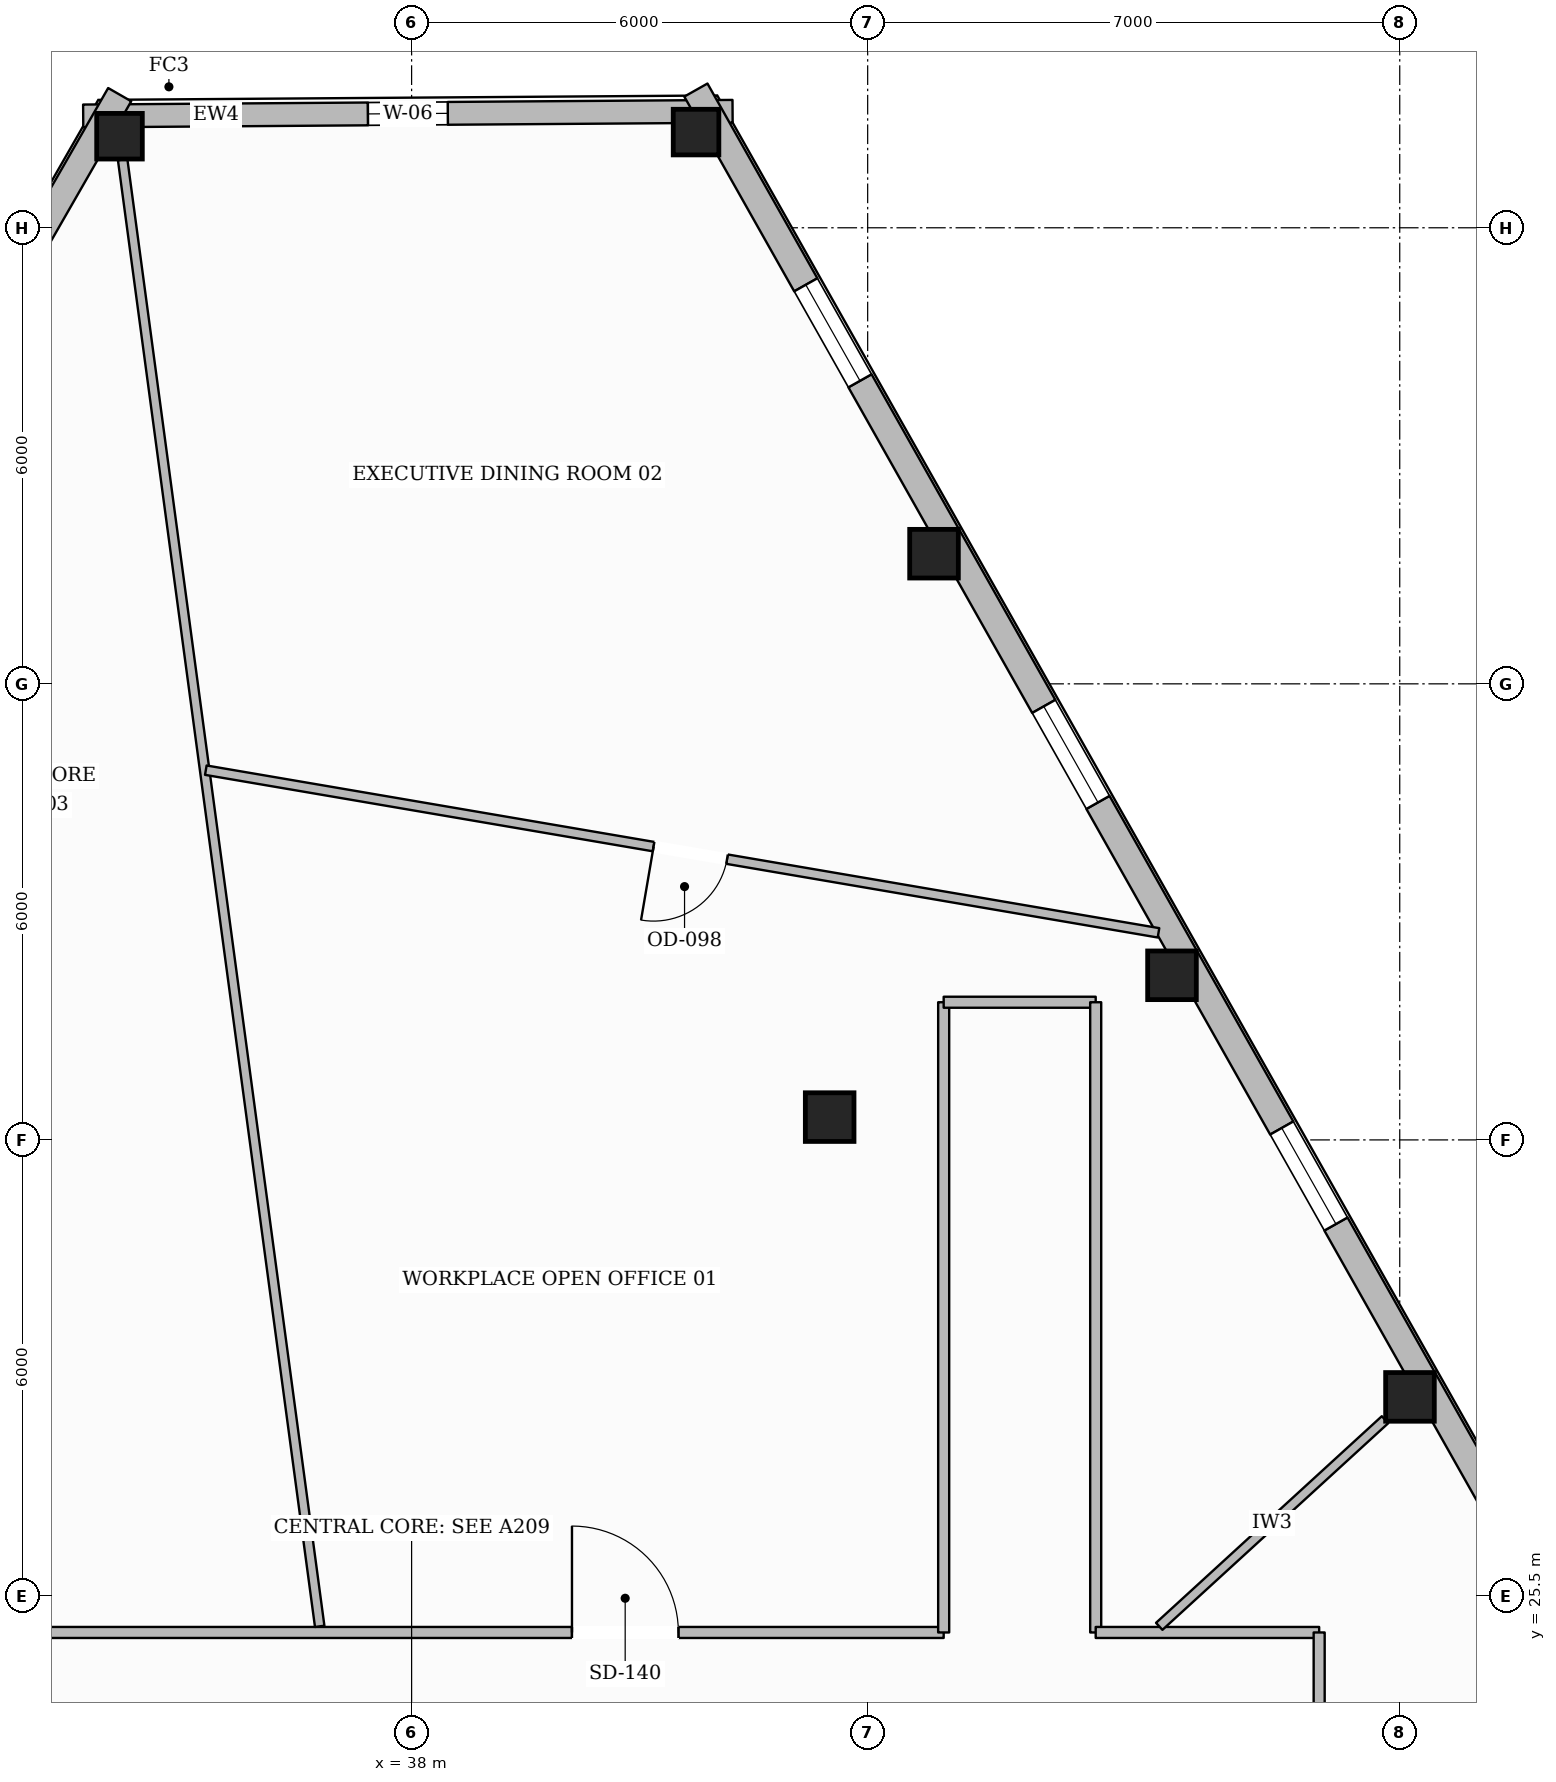
"""IFC4 building model, lengths in metres.
Left out: names, types, materials, properties, quantities, classifications, styles, units other than length and angle.
Written with IfcOpenShell. Run it as: python <this file> out.ifc"""

import sys

from ifc_helpers import new_model, si_unit, direction, frame, frame_2d, origin, origin_2d, place, context, subcontext, project, spatial, rectangle, hollow_rectangle, extrude, element, fill, save


model = new_model("IFC4")
c1 = context("Model", 3, precision=1e-05, world=origin(), true_north=direction((0.0, 1.0)))
c2 = subcontext(c1, "Body", "Model", "MODEL_VIEW")
j1 = project(units=[si_unit("LENGTHUNIT", "METRE"), si_unit("PLANEANGLEUNIT", "RADIAN")], contexts=[c1])
p1 = place(None, origin())
s1 = spatial("IfcSite", under=j1, at=p1, CompositionType="ELEMENT")
p2 = place(p1, origin())
s2 = spatial("IfcBuilding", under=s1, at=p2, CompositionType="ELEMENT")
p3 = place(p2, frame((0.0, 0.0, 226.6)))
s3 = spatial("IfcBuildingStorey", under=s2, at=p3, CompositionType="ELEMENT", Elevation=226.6)
p4 = place(p3, frame((34.157, 44.705, 0.0), z_axis=(0.0, 0.0, 1.0), x_axis=(1.0, 0.0, 0.0)))
e1 = element("IfcColumn", 1, at=p4, inside=s3, PredefinedType="COLUMN", context=c2, shape_type="SweptSolid", body=[
    extrude(hollow_rectangle(XDim=0.6, YDim=0.6, WallThickness=0.028, at=origin_2d()), origin(), (0.0, 0.0, 1.0), 3.6),
])
for number, where, z_axis, x_axis in (
    (2, (51.135, 28.119, 0.0), (0.0, 0.0, 1.0), (1.0, 0.0, 0.0)),
    (3, (48.004, 33.666, 0.0), (0.0, 0.0, 1.0), (1.0, 0.0, 0.0)),
    (4, (44.873, 39.212, 0.0), (0.0, 0.0, 1.0), (1.0, 0.0, 0.0)),
):
    element("IfcColumn", number, at=place(p3, frame(where, z_axis=z_axis, x_axis=x_axis)), inside=s3, PredefinedType="COLUMN", context=c2, shape_type="SweptSolid", body=[
        extrude(hollow_rectangle(XDim=0.64, YDim=0.64, WallThickness=0.028, at=origin_2d()), origin(), (0.0, 0.0, 1.0), 3.6),
    ])
p5 = place(p3, frame((41.742, 44.759, 0.0), z_axis=(0.0, 0.0, 1.0), x_axis=(1.0, 0.0, 0.0)))
e5 = element("IfcColumn", 5, at=p5, inside=s3, PredefinedType="COLUMN", context=c2, shape_type="SweptSolid", body=[
    extrude(hollow_rectangle(XDim=0.6, YDim=0.6, WallThickness=0.028, at=origin_2d()), origin(), (0.0, 0.0, 1.0), 3.6),
])
p6 = place(p3, frame((43.5, 31.8, 0.0), z_axis=(0.0, 0.0, 1.0), x_axis=(1.0, 0.0, 0.0)))
e6 = element("IfcColumn", 6, at=p6, inside=s3, PredefinedType="COLUMN", context=c2, shape_type="SweptSolid", body=[
    extrude(hollow_rectangle(XDim=0.64, YDim=0.64, WallThickness=0.028, at=origin_2d()), origin(), (0.0, 0.0, 1.0), 3.6),
])
p7 = place(p3, frame((33.679, 44.971, 0.0), z_axis=(0.0, 0.0, 1.0), x_axis=(0.999974684305, 0.007115528717, 0.0)))
e7 = element("IfcWall", 7, at=p7, inside=s3, PredefinedType="STANDARD", context=c2, shape_type="SweptSolid", body=[
    extrude(rectangle(XDim=8.543, YDim=0.3, at=frame_2d((4.272, 0.0))), origin(), (0.0, 0.0, 1.0), 3.132),
])
p8 = place(p7, frame((3.747, 0.0, 0.65)))
e8 = element("IfcOpeningElement", 8, at=p8, cuts=e7, PredefinedType="OPENING", context=c2, shape_type="SweptSolid", body=[
    extrude(rectangle(XDim=1.05, YDim=1.7, at=frame_2d((0.525, 0.85))), frame((0.0, 0.16, 0.0), z_axis=(0.0, -1.0, 0.0), x_axis=(1.0, 0.0, 0.0)), (0.0, 0.0, 1.0), 0.32),
])
p9 = place(p3, frame((14.425, 10.865, 0.0), z_axis=(0.0, 0.0, 1.0), x_axis=(0.497768108872, 0.867310157781, 0.0)))
e9 = element("IfcWall", 9, at=p9, inside=s3, PredefinedType="STANDARD", context=c2, shape_type="SweptSolid", body=[
    extrude(rectangle(XDim=39.647, YDim=0.35, at=frame_2d((19.823, 0.0))), origin(), (0.0, 0.0, 1.0), 3.132),
])
p10 = place(p9, frame((35.221, 0.0, 0.65)))
e10 = element("IfcOpeningElement", 10, at=p10, cuts=e9, PredefinedType="OPENING", context=c2, shape_type="SweptSolid", body=[
    extrude(rectangle(XDim=1.45, YDim=1.75, at=frame_2d((0.725, 0.875))), frame((0.0, 0.185, 0.0), z_axis=(0.0, -1.0, 0.0), x_axis=(1.0, 0.0, 0.0)), (0.0, 0.0, 1.0), 0.37),
])
p11 = place(p9, frame((28.771, 0.0, 0.65)))
e11 = element("IfcOpeningElement", 11, at=p11, cuts=e9, PredefinedType="OPENING", context=c2, shape_type="SweptSolid", body=[
    extrude(rectangle(XDim=1.45, YDim=1.75, at=frame_2d((0.725, 0.875))), frame((0.0, 0.185, 0.0), z_axis=(0.0, -1.0, 0.0), x_axis=(1.0, 0.0, 0.0)), (0.0, 0.0, 1.0), 0.37),
])
p12 = place(p9, frame((15.872, 0.0, 0.65)))
e12 = element("IfcOpeningElement", 12, at=p12, cuts=e9, PredefinedType="OPENING", context=c2, shape_type="SweptSolid", body=[
    extrude(rectangle(XDim=1.45, YDim=1.75, at=frame_2d((0.725, 0.875))), frame((0.0, 0.185, 0.0), z_axis=(0.0, -1.0, 0.0), x_axis=(1.0, 0.0, 0.0)), (0.0, 0.0, 1.0), 0.37),
])
p13 = place(p9, frame((9.423, 0.0, 0.65)))
e13 = element("IfcOpeningElement", 13, at=p13, cuts=e9, PredefinedType="OPENING", context=c2, shape_type="SweptSolid", body=[
    extrude(rectangle(XDim=1.45, YDim=1.75, at=frame_2d((0.725, 0.875))), frame((0.0, 0.185, 0.0), z_axis=(0.0, -1.0, 0.0), x_axis=(1.0, 0.0, 0.0)), (0.0, 0.0, 1.0), 0.37),
])
p14 = place(p9, frame((2.973, 0.0, 0.65)))
e14 = element("IfcOpeningElement", 14, at=p14, cuts=e9, PredefinedType="OPENING", context=c2, shape_type="SweptSolid", body=[
    extrude(rectangle(XDim=1.45, YDim=1.75, at=frame_2d((0.725, 0.875))), frame((0.0, 0.185, 0.0), z_axis=(0.0, -1.0, 0.0), x_axis=(1.0, 0.0, 0.0)), (0.0, 0.0, 1.0), 0.37),
])
p15 = place(p3, frame((41.74, 45.312, 0.0), z_axis=(0.0, 0.0, 1.0), x_axis=(0.491560367125, -0.870843502285, 0.0)))
e15 = element("IfcWall", 15, at=p15, inside=s3, PredefinedType="STANDARD", context=c2, shape_type="SweptSolid", body=[
    extrude(rectangle(XDim=39.17, YDim=0.35, at=frame_2d((19.585, 0.0))), origin(), (0.0, 0.0, 1.0), 3.132),
])
p16 = place(p15, frame((34.788, 0.0, 0.65)))
e16 = element("IfcOpeningElement", 16, at=p16, cuts=e15, PredefinedType="OPENING", context=c2, shape_type="SweptSolid", body=[
    extrude(rectangle(XDim=1.45, YDim=1.75, at=frame_2d((0.725, 0.875))), frame((0.0, 0.185, 0.0), z_axis=(0.0, -1.0, 0.0), x_axis=(1.0, 0.0, 0.0)), (0.0, 0.0, 1.0), 0.37),
])
p17 = place(p15, frame((28.419, 0.0, 0.65)))
e17 = element("IfcOpeningElement", 17, at=p17, cuts=e15, PredefinedType="OPENING", context=c2, shape_type="SweptSolid", body=[
    extrude(rectangle(XDim=1.45, YDim=1.75, at=frame_2d((0.725, 0.875))), frame((0.0, 0.185, 0.0), z_axis=(0.0, -1.0, 0.0), x_axis=(1.0, 0.0, 0.0)), (0.0, 0.0, 1.0), 0.37),
])
p18 = place(p15, frame((15.68, 0.0, 0.65)))
e18 = element("IfcOpeningElement", 18, at=p18, cuts=e15, PredefinedType="OPENING", context=c2, shape_type="SweptSolid", body=[
    extrude(rectangle(XDim=1.45, YDim=1.75, at=frame_2d((0.725, 0.875))), frame((0.0, 0.185, 0.0), z_axis=(0.0, -1.0, 0.0), x_axis=(1.0, 0.0, 0.0)), (0.0, 0.0, 1.0), 0.37),
])
p19 = place(p15, frame((9.311, 0.0, 0.65)))
e19 = element("IfcOpeningElement", 19, at=p19, cuts=e15, PredefinedType="OPENING", context=c2, shape_type="SweptSolid", body=[
    extrude(rectangle(XDim=1.45, YDim=1.75, at=frame_2d((0.725, 0.875))), frame((0.0, 0.185, 0.0), z_axis=(0.0, -1.0, 0.0), x_axis=(1.0, 0.0, 0.0)), (0.0, 0.0, 1.0), 0.37),
])
p20 = place(p15, frame((2.942, 0.0, 0.65)))
e20 = element("IfcOpeningElement", 20, at=p20, cuts=e15, PredefinedType="OPENING", context=c2, shape_type="SweptSolid", body=[
    extrude(rectangle(XDim=1.45, YDim=1.75, at=frame_2d((0.725, 0.875))), frame((0.0, 0.185, 0.0), z_axis=(0.0, -1.0, 0.0), x_axis=(1.0, 0.0, 0.0)), (0.0, 0.0, 1.0), 0.37),
])
p21 = place(p3, frame((31.0, 25.02, 0.0), z_axis=(0.0, 0.0, 1.0), x_axis=(1.0, 0.0, 0.0)))
e21 = element("IfcWall", 21, at=p21, inside=s3, PredefinedType="PARTITIONING", context=c2, shape_type="SweptSolid", body=[
    extrude(rectangle(XDim=14.0, YDim=0.145, at=frame_2d((7.0, 0.0))), origin(), (0.0, 0.0, 1.0), 3.6),
])
p22 = place(p21, frame((9.11, 0.0, 0.0)))
e22 = element("IfcOpeningElement", 22, at=p22, cuts=e21, PredefinedType="OPENING", context=c2, shape_type="SweptSolid", body=[
    extrude(rectangle(XDim=1.4, YDim=2.2, at=frame_2d((0.7, 1.1))), frame((0.0, 0.083, 0.0), z_axis=(0.0, -1.0, 0.0), x_axis=(1.0, 0.0, 0.0)), (0.0, 0.0, 1.0), 0.165),
])
p23 = place(p3, frame((45.0, 25.02, 0.0), z_axis=(0.0, 0.0, 1.0), x_axis=(0.0, 1.0, 0.0)))
e23 = element("IfcWall", 23, at=p23, inside=s3, PredefinedType="PARTITIONING", context=c2, shape_type="SweptSolid", body=[
    extrude(rectangle(XDim=8.291, YDim=0.145, at=frame_2d((4.146, 0.0))), origin(), (0.0, 0.0, 1.0), 3.141),
])
p24 = place(p3, frame((45.0, 33.311, 0.0), z_axis=(0.0, 0.0, 1.0), x_axis=(1.0, 0.0, 0.0)))
e24 = element("IfcWall", 24, at=p24, inside=s3, PredefinedType="PARTITIONING", context=c2, shape_type="SweptSolid", body=[
    extrude(rectangle(XDim=2.0, YDim=0.145, at=frame_2d((1.0, 0.0))), origin(), (0.0, 0.0, 1.0), 3.6),
])
p25 = place(p3, frame((47.0, 33.311, 0.0), z_axis=(0.0, 0.0, 1.0), x_axis=(0.0, -1.0, 0.0)))
e25 = element("IfcWall", 25, at=p25, inside=s3, PredefinedType="PARTITIONING", context=c2, shape_type="SweptSolid", body=[
    extrude(rectangle(XDim=8.291, YDim=0.145, at=frame_2d((4.146, 0.0))), origin(), (0.0, 0.0, 1.0), 3.141),
])
p26 = place(p3, frame((47.0, 25.02, 0.0), z_axis=(0.0, 0.0, 1.0), x_axis=(1.0, 0.0, 0.0)))
e26 = element("IfcWall", 26, at=p26, inside=s3, PredefinedType="PARTITIONING", context=c2, shape_type="SweptSolid", body=[
    extrude(rectangle(XDim=2.94, YDim=0.145, at=frame_2d((1.47, 0.0))), origin(), (0.0, 0.0, 1.0), 3.6),
])
p27 = place(p3, frame((49.94, 25.02, 0.0), z_axis=(0.0, 0.0, 1.0), x_axis=(0.0, -1.0, 0.0)))
e27 = element("IfcWall", 27, at=p27, inside=s3, PredefinedType="PARTITIONING", context=c2, shape_type="SweptSolid", body=[
    extrude(rectangle(XDim=7.92, YDim=0.145, at=frame_2d((3.96, 0.0))), origin(), (0.0, 0.0, 1.0), 3.339),
])
p28 = place(p27, frame((3.26, 0.0, 0.0)))
e28 = element("IfcOpeningElement", 28, at=p28, cuts=e27, PredefinedType="OPENING", context=c2, shape_type="SweptSolid", body=[
    extrude(rectangle(XDim=1.4, YDim=2.2, at=frame_2d((0.7, 1.1))), frame((0.0, 0.083, 0.0), z_axis=(0.0, -1.0, 0.0), x_axis=(1.0, 0.0, 0.0)), (0.0, 0.0, 1.0), 0.165),
])
p29 = place(p3, frame((47.836, 25.101, 0.0), z_axis=(0.0, 0.0, 1.0), x_axis=(0.737755301838, 0.675068229597, 0.0)))
e29 = element("IfcWall", 29, at=p29, inside=s3, PredefinedType="PARTITIONING", context=c2, shape_type="SweptSolid", body=[
    extrude(rectangle(XDim=4.027, YDim=0.125, at=frame_2d((2.014, 0.0))), origin(), (0.0, 0.0, 1.0), 3.6),
])
p30 = place(p3, frame((36.791, 25.101, 0.0), z_axis=(0.0, 0.0, 1.0), x_axis=(-0.133147673906, 0.991096209726, 0.0)))
e30 = element("IfcWall", 30, at=p30, inside=s3, PredefinedType="PARTITIONING", context=c2, shape_type="SweptSolid", body=[
    extrude(rectangle(XDim=19.469, YDim=0.125, at=frame_2d((9.735, 0.0))), origin(), (0.0, 0.0, 1.0), 3.141),
])
p31 = place(p3, frame((47.826, 34.224, 0.0), z_axis=(0.0, 0.0, 1.0), x_axis=(-0.985736503202, 0.168296007841, 0.0)))
e31 = element("IfcWall", 31, at=p31, inside=s3, PredefinedType="PARTITIONING", context=c2, shape_type="SweptSolid", body=[
    extrude(rectangle(XDim=12.715, YDim=0.125, at=frame_2d((6.357, 0.0))), origin(), (0.0, 0.0, 1.0), 3.6),
])
p32 = place(p31, frame((5.759, 0.0, 0.0)))
e32 = element("IfcOpeningElement", 32, at=p32, cuts=e31, PredefinedType="OPENING", context=c2, shape_type="SweptSolid", body=[
    extrude(rectangle(XDim=0.98, YDim=2.15, at=frame_2d((0.49, 1.075))), frame((0.0, 0.073, 0.0), z_axis=(0.0, -1.0, 0.0), x_axis=(1.0, 0.0, 0.0)), (0.0, 0.0, 1.0), 0.145),
])
p33 = place(p18, origin())
e33 = element("IfcWindow", 33, at=p33, inside=s3, PartitioningType="SINGLE_PANEL", PredefinedType="WINDOW", context=c2, shape_type="SweptSolid", body=[
    extrude(rectangle(XDim=1.45, YDim=1.75, at=frame_2d((0.725, 0.875))), frame((0.0, 0.03, 0.0), z_axis=(0.0, -1.0, 0.0), x_axis=(1.0, 0.0, 0.0)), (0.0, 0.0, 1.0), 0.06),
])
fill(e18, e33)
p34 = place(p19, origin())
e34 = element("IfcWindow", 34, at=p34, inside=s3, PartitioningType="SINGLE_PANEL", PredefinedType="WINDOW", context=c2, shape_type="SweptSolid", body=[
    extrude(rectangle(XDim=1.45, YDim=1.75, at=frame_2d((0.725, 0.875))), frame((0.0, 0.03, 0.0), z_axis=(0.0, -1.0, 0.0), x_axis=(1.0, 0.0, 0.0)), (0.0, 0.0, 1.0), 0.06),
])
fill(e19, e34)
p35 = place(p20, origin())
e35 = element("IfcWindow", 35, at=p35, inside=s3, PartitioningType="SINGLE_PANEL", PredefinedType="WINDOW", context=c2, shape_type="SweptSolid", body=[
    extrude(rectangle(XDim=1.45, YDim=1.75, at=frame_2d((0.725, 0.875))), frame((0.0, 0.03, 0.0), z_axis=(0.0, -1.0, 0.0), x_axis=(1.0, 0.0, 0.0)), (0.0, 0.0, 1.0), 0.06),
])
fill(e20, e35)
p36 = place(p8, origin())
e36 = element("IfcWindow", 36, at=p36, inside=s3, PartitioningType="SINGLE_PANEL", PredefinedType="WINDOW", context=c2, shape_type="SweptSolid", body=[
    extrude(rectangle(XDim=1.05, YDim=1.7, at=frame_2d((0.525, 0.85))), frame((0.0, 0.03, 0.0), z_axis=(0.0, -1.0, 0.0), x_axis=(1.0, 0.0, 0.0)), (0.0, 0.0, 1.0), 0.06),
])
fill(e8, e36)
p37 = place(p22, origin())
e37 = element("IfcDoor", 37, at=p37, inside=s3, OperationType="SINGLE_SWING_LEFT", PredefinedType="DOOR", context=c2, shape_type="SweptSolid", body=[
    extrude(rectangle(XDim=1.4, YDim=2.2, at=frame_2d((0.7, 1.1))), frame((0.0, 0.025, 0.0), z_axis=(0.0, -1.0, 0.0), x_axis=(1.0, 0.0, 0.0)), (0.0, 0.0, 1.0), 0.05),
])
fill(e22, e37)
p38 = place(p32, origin())
e38 = element("IfcDoor", 38, at=p38, inside=s3, OperationType="SINGLE_SWING_RIGHT", PredefinedType="DOOR", context=c2, shape_type="SweptSolid", body=[
    extrude(rectangle(XDim=0.98, YDim=2.15, at=frame_2d((0.49, 1.075))), frame((0.0, 0.025, 0.0), z_axis=(0.0, -1.0, 0.0), x_axis=(1.0, 0.0, 0.0)), (0.0, 0.0, 1.0), 0.05),
])
fill(e32, e38)
save(model, sys.argv[1])
